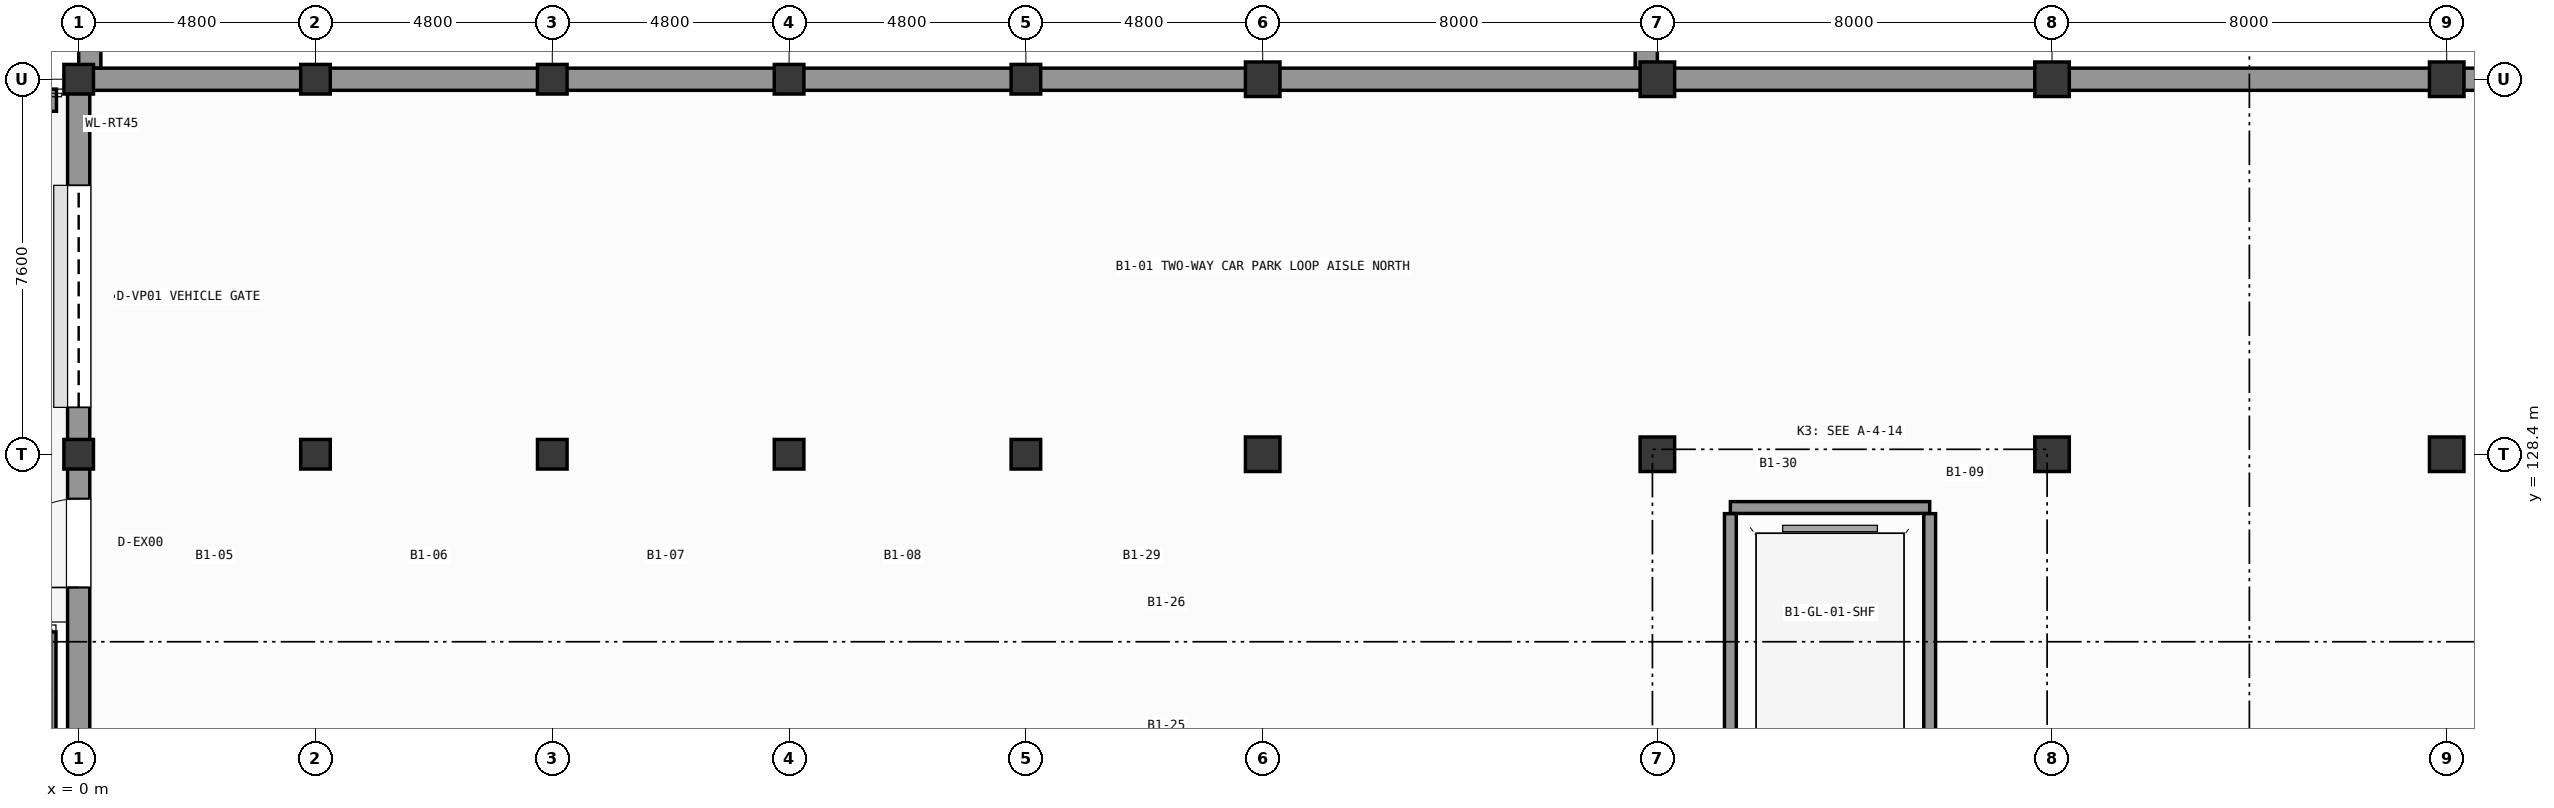
"""IFC4 building model, lengths in metres.
Left out: names, types, materials, properties, quantities, classifications, styles, units other than length and angle.
Written with IfcOpenShell. Run it as: python <this file> out.ifc"""

import sys

from ifc_helpers import new_model, si_unit, direction, frame, frame_2d, origin, origin_2d, place, context, subcontext, project, spatial, polyline, rectangle, outline, extrude, element, fill, save


model = new_model("IFC4")
c1 = context("Model", 3, precision=1e-05, world=origin(), true_north=direction((0.0, 1.0)))
c2 = subcontext(c1, "Body", "Model", "MODEL_VIEW")
j1 = project(units=[si_unit("LENGTHUNIT", "METRE"), si_unit("PLANEANGLEUNIT", "RADIAN")], contexts=[c1])
p1 = place(None, origin())
s1 = spatial("IfcSite", under=j1, at=p1, CompositionType="ELEMENT")
p2 = place(p1, origin())
s2 = spatial("IfcBuilding", under=s1, at=p2, CompositionType="ELEMENT")
p3 = place(p2, frame((0.0, 0.0, -4.8)))
s3 = spatial("IfcBuildingStorey", under=s2, at=p3, CompositionType="ELEMENT", Elevation=-4.8)
for number, where, z_axis, x_axis in (
    (1, (0.0, 128.4, 0.0), (0.0, 0.0, 1.0), (1.0, 0.0, 0.0)),
    (2, (0.0, 136.0, 0.0), (0.0, 0.0, 1.0), (1.0, 0.0, 0.0)),
    (3, (4.8, 128.4, 0.0), (0.0, 0.0, 1.0), (1.0, 0.0, 0.0)),
    (4, (4.8, 136.0, 0.0), (0.0, 0.0, 1.0), (1.0, 0.0, 0.0)),
    (5, (9.6, 128.4, 0.0), (0.0, 0.0, 1.0), (1.0, 0.0, 0.0)),
    (6, (9.6, 136.0, 0.0), (0.0, 0.0, 1.0), (1.0, 0.0, 0.0)),
    (7, (14.4, 128.4, 0.0), (0.0, 0.0, 1.0), (1.0, 0.0, 0.0)),
    (8, (14.4, 136.0, 0.0), (0.0, 0.0, 1.0), (1.0, 0.0, 0.0)),
    (9, (19.2, 128.4, 0.0), (0.0, 0.0, 1.0), (1.0, 0.0, 0.0)),
    (10, (19.2, 136.0, 0.0), (0.0, 0.0, 1.0), (1.0, 0.0, 0.0)),
):
    element("IfcColumn", number, at=place(p3, frame(where, z_axis=z_axis, x_axis=x_axis)), inside=s3, PredefinedType="COLUMN", context=c2, shape_type="SweptSolid", body=[
        extrude(rectangle(XDim=0.6, YDim=0.6, at=origin_2d()), origin(), (0.0, 0.0, 1.0), 4.8),
    ])
for number, where, z_axis, x_axis in (
    (11, (24.0, 128.4, 0.0), (0.0, 0.0, 1.0), (1.0, 0.0, 0.0)),
    (12, (24.0, 136.0, 0.0), (0.0, 0.0, 1.0), (1.0, 0.0, 0.0)),
    (13, (32.0, 128.4, 0.0), (0.0, 0.0, 1.0), (1.0, 0.0, 0.0)),
    (14, (32.0, 136.0, 0.0), (0.0, 0.0, 1.0), (1.0, 0.0, 0.0)),
    (15, (40.0, 128.4, 0.0), (0.0, 0.0, 1.0), (1.0, 0.0, 0.0)),
    (16, (40.0, 136.0, 0.0), (0.0, 0.0, 1.0), (1.0, 0.0, 0.0)),
    (17, (48.0, 128.4, 0.0), (0.0, 0.0, 1.0), (1.0, 0.0, 0.0)),
    (18, (48.0, 136.0, 0.0), (0.0, 0.0, 1.0), (1.0, 0.0, 0.0)),
):
    element("IfcColumn", number, at=place(p3, frame(where, z_axis=z_axis, x_axis=x_axis)), inside=s3, PredefinedType="COLUMN", context=c2, shape_type="SweptSolid", body=[
        extrude(rectangle(XDim=0.7, YDim=0.7, at=origin_2d()), origin(), (0.0, 0.0, 1.0), 4.8),
    ])
p4 = place(p3, frame((48.0, 136.0, 0.0), z_axis=(0.0, 0.0, 1.0), x_axis=(1.0, 0.0, 0.0)))
e19 = element("IfcWall", 19, at=p4, inside=s3, PredefinedType="USERDEFINED", context=c2, shape_type="SweptSolid", body=[
    extrude(rectangle(XDim=1.771, YDim=0.45, at=frame_2d((0.885, 0.0))), origin(), (0.0, 0.0, 1.0), 4.5),
])
for number, where, z_axis, x_axis in (
    (20, (40.0, 136.0, 0.0), (0.0, 0.0, 1.0), (1.0, 0.0, 0.0)),
    (21, (32.0, 136.0, 0.0), (0.0, 0.0, 1.0), (1.0, 0.0, 0.0)),
    (22, (24.0, 136.0, 0.0), (0.0, 0.0, 1.0), (1.0, 0.0, 0.0)),
):
    element("IfcWall", number, at=place(p3, frame(where, z_axis=z_axis, x_axis=x_axis)), inside=s3, PredefinedType="USERDEFINED", context=c2, shape_type="SweptSolid", body=[
        extrude(rectangle(XDim=8.0, YDim=0.45, at=frame_2d((4.0, 0.0))), origin(), (0.0, 0.0, 1.0), 4.5),
    ])
for number, where, z_axis, x_axis in (
    (23, (19.2, 136.0, 0.0), (0.0, 0.0, 1.0), (1.0, 0.0, 0.0)),
    (24, (14.4, 136.0, 0.0), (0.0, 0.0, 1.0), (1.0, 0.0, 0.0)),
):
    element("IfcWall", number, at=place(p3, frame(where, z_axis=z_axis, x_axis=x_axis)), inside=s3, PredefinedType="USERDEFINED", context=c2, shape_type="SweptSolid", body=[
        extrude(rectangle(XDim=4.8, YDim=0.45, at=frame_2d((2.4, 0.0))), origin(), (0.0, 0.0, 1.0), 4.5),
    ])
p5 = place(p3, frame((9.6, 136.0, 0.0), z_axis=(0.0, 0.0, 1.0), x_axis=(1.0, 0.0, 0.0)))
e25 = element("IfcWall", 25, at=p5, inside=s3, PredefinedType="USERDEFINED", context=c2, shape_type="SweptSolid", body=[
    extrude(rectangle(XDim=4.8, YDim=0.45, at=frame_2d((2.4, 0.0))), origin(), (0.0, 0.0, 1.0), 4.5),
])
for number, where, z_axis, x_axis in (
    (26, (4.8, 136.0, 0.0), (0.0, 0.0, 1.0), (1.0, 0.0, 0.0)),
    (27, (0.0, 136.0, 0.0), (0.0, 0.0, 1.0), (1.0, 0.0, 0.0)),
):
    element("IfcWall", number, at=place(p3, frame(where, z_axis=z_axis, x_axis=x_axis)), inside=s3, PredefinedType="USERDEFINED", context=c2, shape_type="SweptSolid", body=[
        extrude(rectangle(XDim=4.8, YDim=0.45, at=frame_2d((2.4, 0.0))), origin(), (0.0, 0.0, 1.0), 4.5),
    ])
p6 = place(p3, frame((0.0, 128.4, 0.0), z_axis=(0.0, 0.0, 1.0), x_axis=(0.0, 1.0, 0.0)))
e28 = element("IfcWall", 28, at=p6, inside=s3, PredefinedType="USERDEFINED", context=c2, shape_type="SweptSolid", body=[
    extrude(rectangle(XDim=7.371, YDim=0.45, at=frame_2d((3.686, 0.0))), origin(), (0.0, 0.0, 1.0), 4.5),
])
p7 = place(p6, frame((0.95, 0.0, 0.0)))
e29 = element("IfcOpeningElement", 29, at=p7, cuts=e28, PredefinedType="OPENING", context=c2, shape_type="SweptSolid", body=[
    extrude(rectangle(XDim=4.5, YDim=3.2, at=frame_2d((2.25, 1.6))), frame((0.0, 0.235, 0.0), z_axis=(0.0, -1.0, 0.0), x_axis=(1.0, 0.0, 0.0)), (0.0, 0.0, 1.0), 0.47),
])
p8 = place(p3, frame((0.0, 120.8, 0.0), z_axis=(0.0, 0.0, 1.0), x_axis=(0.0, 1.0, 0.0)))
e30 = element("IfcWall", 30, at=p8, inside=s3, PredefinedType="USERDEFINED", context=c2, shape_type="SweptSolid", body=[
    extrude(rectangle(XDim=7.6, YDim=0.45, at=frame_2d((3.8, 0.0))), origin(), (0.0, 0.0, 1.0), 4.5),
])
p9 = place(p8, frame((4.9, 0.0, 0.0)))
e31 = element("IfcOpeningElement", 31, at=p9, cuts=e30, PredefinedType="OPENING", context=c2, shape_type="SweptSolid", body=[
    extrude(rectangle(XDim=1.8, YDim=2.4, at=frame_2d((0.9, 1.2))), frame((0.0, 0.235, 0.0), z_axis=(0.0, -1.0, 0.0), x_axis=(1.0, 0.0, 0.0)), (0.0, 0.0, 1.0), 0.47),
])
p10 = place(p3, frame((31.775, 136.229, 0.0), z_axis=(0.0, 0.0, 1.0), x_axis=(0.0, 1.0, 0.0)))
e32 = element("IfcWall", 32, at=p10, inside=s3, PredefinedType="SOLIDWALL", context=c2, shape_type="SweptSolid", body=[
    extrude(rectangle(XDim=6.546, YDim=0.45, at=frame_2d((3.273, 0.0))), origin(), (0.0, 0.0, 1.0), 4.55),
])
p11 = place(p3, frame((0.225, 142.546, 0.0), z_axis=(0.0, 0.0, 1.0), x_axis=(0.0, -1.0, 0.0)))
e33 = element("IfcWall", 33, at=p11, inside=s3, PredefinedType="SOLIDWALL", context=c2, shape_type="SweptSolid", body=[
    extrude(rectangle(XDim=6.317, YDim=0.45, at=frame_2d((3.158, 0.0))), origin(), (0.0, 0.0, 1.0), 4.55),
])
p12 = place(p3, frame((-0.685, 89.0, -0.3), z_axis=(0.0, 0.0, 1.0), x_axis=(0.0, 1.0, 0.0)))
e34 = element("IfcWall", 34, at=p12, inside=s3, PredefinedType="USERDEFINED", context=c2, shape_type="SweptSolid", body=[
    extrude(outline(polyline([(0.0, 0.0), (35.8, 0.0), (35.8, 0.05), (0.0, 4.8), (0.0, 0.0)])), frame((0.0, 0.225, 0.0), z_axis=(0.0, -1.0, 0.0), x_axis=(1.0, 0.0, 0.0)), (0.0, 0.0, 1.0), 0.45),
])
p13 = place(p3, frame((-6.75, 135.575, -0.9), z_axis=(0.0, 0.0, 1.0), x_axis=(1.0, 0.0, 0.0)))
e35 = element("IfcWall", 35, at=p13, inside=s3, PredefinedType="USERDEFINED", context=c2, shape_type="SweptSolid", body=[
    extrude(rectangle(XDim=6.3, YDim=0.45, at=frame_2d((3.15, 0.0))), origin(), (0.0, 0.0, 1.0), 0.6),
])
p14 = place(p3, frame((33.48, 127.32, 0.0), z_axis=(0.0, 0.0, 1.0), x_axis=(1.0, 0.0, 0.0)))
e36 = element("IfcWall", 36, at=p14, inside=s3, PredefinedType="SHEAR", context=c2, shape_type="SweptSolid", body=[
    extrude(rectangle(XDim=4.04, YDim=0.24, at=frame_2d((2.02, 0.0))), origin(), (0.0, 0.0, 1.0), 4.5),
])
for number, where, z_axis, x_axis in (
    (37, (33.48, 122.204, 0.0), (0.0, 0.0, 1.0), (0.0, 1.0, 0.0)),
    (38, (37.52, 122.204, 0.0), (0.0, 0.0, 1.0), (0.0, 1.0, 0.0)),
):
    element("IfcWall", number, at=place(p3, frame(where, z_axis=z_axis, x_axis=x_axis)), inside=s3, PredefinedType="SHEAR", context=c2, shape_type="SweptSolid", body=[
        extrude(rectangle(XDim=4.992, YDim=0.24, at=frame_2d((2.496, 0.0))), origin(), (0.0, 0.0, 1.0), 4.5),
    ])
p15 = place(p7, origin())
e39 = element("IfcDoor", 39, at=p15, inside=s3, OperationType="ROLLINGUP", PredefinedType="DOOR", context=c2, shape_type="SweptSolid", body=[
    extrude(rectangle(XDim=4.5, YDim=3.2, at=frame_2d((2.25, 1.6))), frame((0.0, 0.025, 0.0), z_axis=(0.0, -1.0, 0.0), x_axis=(1.0, 0.0, 0.0)), (0.0, 0.0, 1.0), 0.05),
])
fill(e29, e39)
p16 = place(p9, origin())
e40 = element("IfcDoor", 40, at=p16, inside=s3, OperationType="SINGLE_SWING_LEFT", PredefinedType="DOOR", context=c2, shape_type="SweptSolid", body=[
    extrude(rectangle(XDim=1.8, YDim=2.4, at=frame_2d((0.9, 1.2))), frame((0.0, 0.025, 0.0), z_axis=(0.0, -1.0, 0.0), x_axis=(1.0, 0.0, 0.0)), (0.0, 0.0, 1.0), 0.05),
])
fill(e31, e40)
save(model, sys.argv[1])
